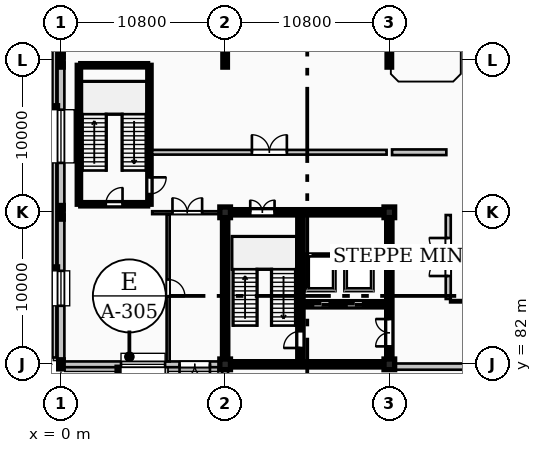
"""IFC4 building model, lengths in metres.
Left out: names, types, materials, properties, quantities, classifications, styles, units other than length and angle.
Written with IfcOpenShell. Run it as: python <this file> out.ifc"""

import sys

from ifc_helpers import new_model, si_unit, direction, frame, frame_2d, origin, origin_2d, place, context, subcontext, project, spatial, rectangle, i_section, extrude, element, fill, save


model = new_model("IFC4")
c1 = context("Model", 3, precision=1e-05, world=origin(), true_north=direction((0.0, 1.0)))
c2 = subcontext(c1, "Body", "Model", "MODEL_VIEW")
j1 = project(units=[si_unit("LENGTHUNIT", "METRE"), si_unit("PLANEANGLEUNIT", "RADIAN")], contexts=[c1])
p1 = place(None, origin())
s1 = spatial("IfcSite", under=j1, at=p1, CompositionType="ELEMENT")
p2 = place(p1, origin())
s2 = spatial("IfcBuilding", under=s1, at=p2, CompositionType="ELEMENT")
p3 = place(p2, origin())
s3 = spatial("IfcBuildingStorey", under=s2, at=p3, CompositionType="ELEMENT", Elevation=0.0)
p4 = place(p3, frame((0.0, 82.0, 0.0), z_axis=(0.0, 0.0, 1.0), x_axis=(1.0, 0.0, 0.0)))
e1 = element("IfcColumn", 1, at=p4, inside=s3, PredefinedType="COLUMN", context=c2, shape_type="SweptSolid", body=[
    extrude(i_section(OverallWidth=0.3, OverallDepth=0.6, WebThickness=0.015, FlangeThickness=0.03, FilletRadius=0.027, at=origin_2d()), origin(), (0.0, 0.0, 1.0), 4.8),
])
for number, where, z_axis, x_axis in (
    (2, (0.0, 92.0, 0.0), (0.0, 0.0, 1.0), (1.0, 0.0, 0.0)),
    (3, (0.0, 102.0, 0.0), (0.0, 0.0, 1.0), (1.0, 0.0, 0.0)),
):
    element("IfcColumn", number, at=place(p3, frame(where, z_axis=z_axis, x_axis=x_axis)), inside=s3, PredefinedType="COLUMN", context=c2, shape_type="SweptSolid", body=[
        extrude(i_section(OverallWidth=0.3, OverallDepth=0.9, WebThickness=0.019, FlangeThickness=0.035, FilletRadius=0.03, at=origin_2d()), origin(), (0.0, 0.0, 1.0), 4.8),
    ])
for number, where, z_axis, x_axis in (
    (4, (10.8, 82.0, 0.0), (0.0, 0.0, 1.0), (1.0, 0.0, 0.0)),
    (5, (10.8, 92.0, 0.0), (0.0, 0.0, 1.0), (1.0, 0.0, 0.0)),
):
    element("IfcColumn", number, at=place(p3, frame(where, z_axis=z_axis, x_axis=x_axis)), inside=s3, PredefinedType="COLUMN", context=c2, shape_type="SweptSolid", body=[
        extrude(rectangle(XDim=0.7, YDim=0.7, at=origin_2d()), origin(), (0.0, 0.0, 1.0), 4.8),
    ])
p5 = place(p3, frame((10.8, 102.0, 0.0), z_axis=(0.0, 0.0, 1.0), x_axis=(1.0, 0.0, 0.0)))
e6 = element("IfcColumn", 6, at=p5, inside=s3, PredefinedType="COLUMN", context=c2, shape_type="SweptSolid", body=[
    extrude(i_section(OverallWidth=0.3, OverallDepth=0.9, WebThickness=0.019, FlangeThickness=0.035, FilletRadius=0.03, at=origin_2d()), origin(), (0.0, 0.0, 1.0), 4.8),
])
for number, where, z_axis, x_axis in (
    (7, (21.6, 82.0, 0.0), (0.0, 0.0, 1.0), (1.0, 0.0, 0.0)),
    (8, (21.6, 92.0, 0.0), (0.0, 0.0, 1.0), (1.0, 0.0, 0.0)),
):
    element("IfcColumn", number, at=place(p3, frame(where, z_axis=z_axis, x_axis=x_axis)), inside=s3, PredefinedType="COLUMN", context=c2, shape_type="SweptSolid", body=[
        extrude(rectangle(XDim=0.7, YDim=0.7, at=origin_2d()), origin(), (0.0, 0.0, 1.0), 4.8),
    ])
p6 = place(p3, frame((21.6, 102.0, 0.0), z_axis=(0.0, 0.0, 1.0), x_axis=(1.0, 0.0, 0.0)))
e9 = element("IfcColumn", 9, at=p6, inside=s3, PredefinedType="COLUMN", context=c2, shape_type="SweptSolid", body=[
    extrude(i_section(OverallWidth=0.3, OverallDepth=0.9, WebThickness=0.019, FlangeThickness=0.035, FilletRadius=0.03, at=origin_2d()), origin(), (0.0, 0.0, 1.0), 4.8),
])
p7 = place(p3, frame((-0.43, 82.45, -1.38), z_axis=(0.0, 0.0, 1.0), x_axis=(0.0, 1.0, 0.0)))
e10 = element("IfcWall", 10, at=p7, inside=s3, PredefinedType="PARAPET", context=c2, shape_type="SweptSolid", body=[
    extrude(rectangle(XDim=29.1, YDim=0.26, at=frame_2d((14.55, 0.0))), origin(), (0.0, 0.0, 1.0), 5.92),
])
p8 = place(p3, frame((0.0, 111.855, 0.0), z_axis=(0.0, 0.0, 1.0), x_axis=(0.0, -1.0, 0.0)))
e11 = element("IfcWall", 11, at=p8, inside=s3, PredefinedType="STANDARD", context=c2, shape_type="SweptSolid", body=[
    extrude(rectangle(XDim=9.71, YDim=0.45, at=frame_2d((4.855, 0.0))), origin(), (0.0, 0.0, 1.0), 4.56),
])
p9 = place(p8, frame((4.08, 0.0, 1.0)))
e12 = element("IfcOpeningElement", 12, at=p9, cuts=e11, PredefinedType="OPENING", context=c2, shape_type="SweptSolid", body=[
    extrude(rectangle(XDim=1.55, YDim=2.5, at=frame_2d((0.775, 1.25))), frame((0.0, 0.235, 0.0), z_axis=(0.0, -1.0, 0.0), x_axis=(1.0, 0.0, 0.0)), (0.0, 0.0, 1.0), 0.47),
])
p10 = place(p3, frame((0.0, 101.855, 0.0), z_axis=(0.0, 0.0, 1.0), x_axis=(0.0, -1.0, 0.0)))
e13 = element("IfcWall", 13, at=p10, inside=s3, PredefinedType="STANDARD", context=c2, shape_type="SweptSolid", body=[
    extrude(rectangle(XDim=9.71, YDim=0.45, at=frame_2d((4.855, 0.0))), origin(), (0.0, 0.0, 1.0), 4.56),
])
p11 = place(p10, frame((3.105, 0.0, 1.0)))
e14 = element("IfcOpeningElement", 14, at=p11, cuts=e13, PredefinedType="OPENING", context=c2, shape_type="SweptSolid", body=[
    extrude(rectangle(XDim=3.5, YDim=2.3, at=frame_2d((1.75, 1.15))), frame((0.0, 0.235, 0.0), z_axis=(0.0, -1.0, 0.0), x_axis=(1.0, 0.0, 0.0)), (0.0, 0.0, 1.0), 0.47),
])
p12 = place(p3, frame((0.0, 91.855, 0.0), z_axis=(0.0, 0.0, 1.0), x_axis=(0.0, -1.0, 0.0)))
e15 = element("IfcWall", 15, at=p12, inside=s3, PredefinedType="STANDARD", context=c2, shape_type="SweptSolid", body=[
    extrude(rectangle(XDim=9.71, YDim=0.45, at=frame_2d((4.855, 0.0))), origin(), (0.0, 0.0, 1.0), 4.56),
])
p13 = place(p12, frame((3.705, 0.0, 1.0)))
e16 = element("IfcOpeningElement", 16, at=p13, cuts=e15, PredefinedType="OPENING", context=c2, shape_type="SweptSolid", body=[
    extrude(rectangle(XDim=2.3, YDim=2.3, at=frame_2d((1.15, 1.15))), frame((0.0, 0.235, 0.0), z_axis=(0.0, -1.0, 0.0), x_axis=(1.0, 0.0, 0.0)), (0.0, 0.0, 1.0), 0.47),
])
p14 = place(p3, frame((0.145, 82.0, 0.0), z_axis=(0.0, 0.0, 1.0), x_axis=(1.0, 0.0, 0.0)))
e17 = element("IfcWall", 17, at=p14, inside=s3, PredefinedType="STANDARD", context=c2, shape_type="SweptSolid", body=[
    extrude(rectangle(XDim=10.51, YDim=0.38, at=frame_2d((5.255, 0.0))), origin(), (0.0, 0.0, 1.0), 4.009),
])
p15 = place(p14, frame((3.805, 0.0, 1.0)))
e18 = element("IfcOpeningElement", 18, at=p15, cuts=e17, PredefinedType="OPENING", context=c2, shape_type="SweptSolid", body=[
    extrude(rectangle(XDim=2.9, YDim=2.5, at=frame_2d((1.45, 1.25))), frame((0.0, 0.2, 0.0), z_axis=(0.0, -1.0, 0.0), x_axis=(1.0, 0.0, 0.0)), (0.0, 0.0, 1.0), 0.4),
])
p16 = place(p14, frame((7.655, 0.0, 0.0)))
e19 = element("IfcOpeningElement", 19, at=p16, cuts=e17, PredefinedType="OPENING", context=c2, shape_type="SweptSolid", body=[
    extrude(rectangle(XDim=2.0, YDim=2.3, at=frame_2d((1.0, 1.15))), frame((0.0, 0.2, 0.0), z_axis=(0.0, -1.0, 0.0), x_axis=(1.0, 0.0, 0.0)), (0.0, 0.0, 1.0), 0.4),
])
p17 = place(p3, frame((10.8, 81.855, 0.0), z_axis=(0.0, 0.0, 1.0), x_axis=(0.0, -1.0, 0.0)))
e20 = element("IfcWall", 20, at=p17, inside=s3, PredefinedType="STANDARD", context=c2, shape_type="SweptSolid", body=[
    extrude(rectangle(XDim=9.71, YDim=0.38, at=frame_2d((4.855, 0.0))), origin(), (0.0, 0.0, 1.0), 4.04),
])
p18 = place(p17, frame((3.655, 0.0, 0.0)))
e21 = element("IfcOpeningElement", 21, at=p18, cuts=e20, PredefinedType="OPENING", context=c2, shape_type="SweptSolid", body=[
    extrude(rectangle(XDim=2.4, YDim=2.6, at=frame_2d((1.2, 1.3))), frame((0.0, 0.2, 0.0), z_axis=(0.0, -1.0, 0.0), x_axis=(1.0, 0.0, 0.0)), (0.0, 0.0, 1.0), 0.4),
])
p19 = place(p3, frame((11.15, 82.0, 0.0), z_axis=(0.0, 0.0, 1.0), x_axis=(1.0, 0.0, 0.0)))
e22 = element("IfcWall", 22, at=p19, inside=s3, PredefinedType="SHEAR", context=c2, shape_type="SweptSolid", body=[
    extrude(rectangle(XDim=10.1, YDim=0.35, at=frame_2d((5.05, 0.0))), origin(), (0.0, 0.0, 1.0), 4.56),
])
p20 = place(p3, frame((11.15, 92.0, 0.0), z_axis=(0.0, 0.0, 1.0), x_axis=(1.0, 0.0, 0.0)))
e23 = element("IfcWall", 23, at=p20, inside=s3, PredefinedType="SHEAR", context=c2, shape_type="SweptSolid", body=[
    extrude(rectangle(XDim=10.1, YDim=0.35, at=frame_2d((5.05, 0.0))), origin(), (0.0, 0.0, 1.0), 4.56),
])
p21 = place(p20, frame((1.3, 0.0, 0.0)))
e24 = element("IfcOpeningElement", 24, at=p21, cuts=e23, PredefinedType="OPENING", context=c2, shape_type="SweptSolid", body=[
    extrude(rectangle(XDim=1.6, YDim=2.2, at=frame_2d((0.8, 1.1))), frame((0.0, 0.185, 0.0), z_axis=(0.0, -1.0, 0.0), x_axis=(1.0, 0.0, 0.0)), (0.0, 0.0, 1.0), 0.37),
])
p22 = place(p3, frame((10.8, 82.35, 0.0), z_axis=(0.0, 0.0, 1.0), x_axis=(0.0, 1.0, 0.0)))
e25 = element("IfcWall", 25, at=p22, inside=s3, PredefinedType="SHEAR", context=c2, shape_type="SweptSolid", body=[
    extrude(rectangle(XDim=9.3, YDim=0.35, at=frame_2d((4.65, 0.0))), origin(), (0.0, 0.0, 1.0), 4.56),
])
p23 = place(p3, frame((21.6, 82.35, 0.0), z_axis=(0.0, 0.0, 1.0), x_axis=(0.0, 1.0, 0.0)))
e26 = element("IfcWall", 26, at=p23, inside=s3, PredefinedType="SHEAR", context=c2, shape_type="SweptSolid", body=[
    extrude(rectangle(XDim=9.3, YDim=0.35, at=frame_2d((4.65, 0.0))), origin(), (0.0, 0.0, 1.0), 4.56),
])
p24 = place(p23, frame((0.83, 0.0, 0.0)))
e27 = element("IfcOpeningElement", 27, at=p24, cuts=e26, PredefinedType="OPENING", context=c2, shape_type="SweptSolid", body=[
    extrude(rectangle(XDim=1.8, YDim=2.25, at=frame_2d((0.9, 1.125))), frame((0.0, 0.185, 0.0), z_axis=(0.0, -1.0, 0.0), x_axis=(1.0, 0.0, 0.0)), (0.0, 0.0, 1.0), 0.37),
])
p25 = place(p3, frame((15.75, 82.175, 0.0), z_axis=(0.0, 0.0, 1.0), x_axis=(0.0, 1.0, 0.0)))
e28 = element("IfcWall", 28, at=p25, inside=s3, PredefinedType="SHEAR", context=c2, shape_type="SweptSolid", body=[
    extrude(rectangle(XDim=9.65, YDim=0.35, at=frame_2d((4.825, 0.0))), origin(), (0.0, 0.0, 1.0), 4.56),
])
p26 = place(p25, frame((0.9, 0.0, 0.0)))
e29 = element("IfcOpeningElement", 29, at=p26, cuts=e28, PredefinedType="OPENING", context=c2, shape_type="SweptSolid", body=[
    extrude(rectangle(XDim=1.1, YDim=2.2, at=frame_2d((0.55, 1.1))), frame((0.0, 0.185, 0.0), z_axis=(0.0, -1.0, 0.0), x_axis=(1.0, 0.0, 0.0)), (0.0, 0.0, 1.0), 0.37),
])
p27 = place(p3, frame((15.93, 85.95, 0.0), z_axis=(0.0, 0.0, 1.0), x_axis=(1.0, 0.0, 0.0)))
e30 = element("IfcWall", 30, at=p27, inside=s3, PredefinedType="SHEAR", context=c2, shape_type="SweptSolid", body=[
    extrude(rectangle(XDim=5.49, YDim=0.35, at=frame_2d((2.745, 0.0))), origin(), (0.0, 0.0, 1.0), 4.56),
])
p28 = place(p27, frame((0.65, 0.0, 0.0)))
e31 = element("IfcOpeningElement", 31, at=p28, cuts=e30, PredefinedType="OPENING", context=c2, shape_type="SweptSolid", body=[
    extrude(rectangle(XDim=1.1, YDim=2.2, at=frame_2d((0.55, 1.1))), frame((0.0, 0.185, 0.0), z_axis=(0.0, -1.0, 0.0), x_axis=(1.0, 0.0, 0.0)), (0.0, 0.0, 1.0), 0.37),
])
p29 = place(p27, frame((2.85, 0.0, 0.0)))
e32 = element("IfcOpeningElement", 32, at=p29, cuts=e30, PredefinedType="OPENING", context=c2, shape_type="SweptSolid", body=[
    extrude(rectangle(XDim=1.1, YDim=2.2, at=frame_2d((0.55, 1.1))), frame((0.0, 0.185, 0.0), z_axis=(0.0, -1.0, 0.0), x_axis=(1.0, 0.0, 0.0)), (0.0, 0.0, 1.0), 0.37),
])
p30 = place(p3, frame((1.18, 92.53, 0.0), z_axis=(0.0, 0.0, 1.0), x_axis=(0.0, 1.0, 0.0)))
e33 = element("IfcWall", 33, at=p30, inside=s3, PredefinedType="SHEAR", context=c2, shape_type="SweptSolid", body=[
    extrude(rectangle(XDim=9.14, YDim=0.22, at=frame_2d((4.57, 0.0))), origin(), (0.0, 0.0, 1.0), 4.56),
])
p31 = place(p3, frame((5.82, 92.53, 0.0), z_axis=(0.0, 0.0, 1.0), x_axis=(0.0, 1.0, 0.0)))
e34 = element("IfcWall", 34, at=p31, inside=s3, PredefinedType="SHEAR", context=c2, shape_type="SweptSolid", body=[
    extrude(rectangle(XDim=9.14, YDim=0.22, at=frame_2d((4.57, 0.0))), origin(), (0.0, 0.0, 1.0), 4.56),
])
p32 = place(p31, frame((0.67, 0.0, 0.0)))
e35 = element("IfcOpeningElement", 35, at=p32, cuts=e34, PredefinedType="OPENING", context=c2, shape_type="SweptSolid", body=[
    extrude(rectangle(XDim=1.1, YDim=2.2, at=frame_2d((0.55, 1.1))), frame((0.0, 0.12, 0.0), z_axis=(0.0, -1.0, 0.0), x_axis=(1.0, 0.0, 0.0)), (0.0, 0.0, 1.0), 0.24),
])
p33 = place(p3, frame((1.3, 101.67, 0.0), z_axis=(0.0, 0.0, 1.0), x_axis=(1.0, 0.0, 0.0)))
e36 = element("IfcWall", 36, at=p33, inside=s3, PredefinedType="SHEAR", context=c2, shape_type="SweptSolid", body=[
    extrude(rectangle(XDim=4.4, YDim=0.22, at=frame_2d((2.2, 0.0))), origin(), (0.0, 0.0, 1.0), 4.56),
])
p34 = place(p3, frame((1.3, 92.53, 0.0), z_axis=(0.0, 0.0, 1.0), x_axis=(1.0, 0.0, 0.0)))
e37 = element("IfcWall", 37, at=p34, inside=s3, PredefinedType="SHEAR", context=c2, shape_type="SweptSolid", body=[
    extrude(rectangle(XDim=4.4, YDim=0.22, at=frame_2d((2.2, 0.0))), origin(), (0.0, 0.0, 1.0), 4.56),
])
p35 = place(p34, frame((1.65, 0.0, 0.0)))
e38 = element("IfcOpeningElement", 38, at=p35, cuts=e37, PredefinedType="OPENING", context=c2, shape_type="SweptSolid", body=[
    extrude(rectangle(XDim=1.1, YDim=2.2, at=frame_2d((0.55, 1.1))), frame((0.0, 0.12, 0.0), z_axis=(0.0, -1.0, 0.0), x_axis=(1.0, 0.0, 0.0)), (0.0, 0.0, 1.0), 0.24),
])
p36 = place(p3, frame((21.78, 81.85, 0.0), z_axis=(0.0, 0.0, 1.0), x_axis=(1.0, 0.0, 0.0)))
e39 = element("IfcWall", 39, at=p36, inside=s3, PredefinedType="PARTITIONING", context=c2, shape_type="SweptSolid", body=[
    extrude(rectangle(XDim=10.42, YDim=0.41, at=frame_2d((5.21, 0.0))), origin(), (0.0, 0.0, 1.0), 3.989),
])
p37 = place(p3, frame((25.6, 86.15, 0.0), z_axis=(0.0, 0.0, 1.0), x_axis=(1.0, 0.0, 0.0)))
e40 = element("IfcWall", 40, at=p37, inside=s3, PredefinedType="PARTITIONING", context=c2, shape_type="SweptSolid", body=[
    extrude(rectangle(XDim=28.22, YDim=0.15, at=frame_2d((14.11, 0.0))), origin(), (0.0, 0.0, 1.0), 4.52),
])
p38 = place(p37, frame((13.235, 0.0, 0.0)))
e41 = element("IfcOpeningElement", 41, at=p38, cuts=e40, PredefinedType="OPENING", context=c2, shape_type="SweptSolid", body=[
    extrude(rectangle(XDim=1.75, YDim=2.45, at=frame_2d((0.875, 1.225))), frame((0.0, 0.085, 0.0), z_axis=(0.0, -1.0, 0.0), x_axis=(1.0, 0.0, 0.0)), (0.0, 0.0, 1.0), 0.17),
])
p39 = place(p3, frame((6.0, 91.975, 0.0), z_axis=(0.0, 0.0, 1.0), x_axis=(1.0, 0.0, 0.0)))
e42 = element("IfcWall", 42, at=p39, inside=s3, PredefinedType="PARTITIONING", context=c2, shape_type="SweptSolid", body=[
    extrude(rectangle(XDim=4.62, YDim=0.19, at=frame_2d((2.31, 0.0))), origin(), (0.0, 0.0, 1.0), 4.069),
])
p40 = place(p39, frame((1.335, 0.0, 0.0)))
e43 = element("IfcOpeningElement", 43, at=p40, cuts=e42, PredefinedType="OPENING", context=c2, shape_type="SweptSolid", body=[
    extrude(rectangle(XDim=1.95, YDim=2.5, at=frame_2d((0.975, 1.25))), frame((0.0, 0.105, 0.0), z_axis=(0.0, -1.0, 0.0), x_axis=(1.0, 0.0, 0.0)), (0.0, 0.0, 1.0), 0.21),
])
p41 = place(p3, frame((6.0, 95.95, 0.0), z_axis=(0.0, 0.0, 1.0), x_axis=(1.0, 0.0, 0.0)))
e44 = element("IfcWall", 44, at=p41, inside=s3, PredefinedType="PARTITIONING", context=c2, shape_type="SweptSolid", body=[
    extrude(rectangle(XDim=15.42, YDim=0.31, at=frame_2d((7.71, 0.0))), origin(), (0.0, 0.0, 1.0), 4.52),
])
p42 = place(p41, frame((6.56, 0.0, 0.0)))
e45 = element("IfcOpeningElement", 45, at=p42, cuts=e44, PredefinedType="OPENING", context=c2, shape_type="SweptSolid", body=[
    extrude(rectangle(XDim=2.3, YDim=2.65, at=frame_2d((1.15, 1.325))), frame((0.0, 0.165, 0.0), z_axis=(0.0, -1.0, 0.0), x_axis=(1.0, 0.0, 0.0)), (0.0, 0.0, 1.0), 0.33),
])
p43 = place(p3, frame((25.475, 86.3, 0.0), z_axis=(0.0, 0.0, 1.0), x_axis=(0.0, 1.0, 0.0)))
e46 = element("IfcWall", 46, at=p43, inside=s3, PredefinedType="PARTITIONING", context=c2, shape_type="SweptSolid", body=[
    extrude(rectangle(XDim=5.52, YDim=0.33, at=frame_2d((2.76, 0.0))), origin(), (0.0, 0.0, 1.0), 4.52),
])
p44 = place(p43, frame((1.51, 0.0, 0.0)))
e47 = element("IfcOpeningElement", 47, at=p44, cuts=e46, PredefinedType="OPENING", context=c2, shape_type="SweptSolid", body=[
    extrude(rectangle(XDim=2.5, YDim=2.75, at=frame_2d((1.25, 1.375))), frame((0.0, 0.175, 0.0), z_axis=(0.0, -1.0, 0.0), x_axis=(1.0, 0.0, 0.0)), (0.0, 0.0, 1.0), 0.35),
])
p45 = place(p3, frame((21.78, 95.95, 0.0), z_axis=(0.0, 0.0, 1.0), x_axis=(1.0, 0.0, 0.0)))
e48 = element("IfcWall", 48, at=p45, inside=s3, PredefinedType="PARTITIONING", context=c2, shape_type="SweptSolid", body=[
    extrude(rectangle(XDim=3.57, YDim=0.37, at=frame_2d((1.785, 0.0))), origin(), (0.0, 0.0, 1.0), 4.52),
])
p46 = place(p3, frame((7.05, 82.19, 0.0), z_axis=(0.0, 0.0, 1.0), x_axis=(0.0, 1.0, 0.0)))
e49 = element("IfcWall", 49, at=p46, inside=s3, PredefinedType="SOLIDWALL", context=c2, shape_type="SweptSolid", body=[
    extrude(rectangle(XDim=9.69, YDim=0.2, at=frame_2d((4.845, 0.0))), origin(), (0.0, 0.0, 1.0), 4.069),
])
p47 = place(p46, frame((4.29, 0.0, 0.0)))
e50 = element("IfcOpeningElement", 50, at=p47, cuts=e49, PredefinedType="OPENING", context=c2, shape_type="SweptSolid", body=[
    extrude(rectangle(XDim=1.1, YDim=2.2, at=frame_2d((0.55, 1.1))), frame((0.0, 0.11, 0.0), z_axis=(0.0, -1.0, 0.0), x_axis=(1.0, 0.0, 0.0)), (0.0, 0.0, 1.0), 0.22),
])
p48 = place(p11, origin())
e51 = element("IfcWindow", 51, at=p48, inside=s3, PartitioningType="SINGLE_PANEL", PredefinedType="WINDOW", context=c2, shape_type="SweptSolid", body=[
    extrude(rectangle(XDim=3.5, YDim=2.3, at=frame_2d((1.75, 1.15))), frame((0.0, 0.03, 0.0), z_axis=(0.0, -1.0, 0.0), x_axis=(1.0, 0.0, 0.0)), (0.0, 0.0, 1.0), 0.06),
])
fill(e14, e51)
p49 = place(p13, origin())
e52 = element("IfcWindow", 52, at=p49, inside=s3, PartitioningType="SINGLE_PANEL", PredefinedType="WINDOW", context=c2, shape_type="SweptSolid", body=[
    extrude(rectangle(XDim=2.3, YDim=2.3, at=frame_2d((1.15, 1.15))), frame((0.0, 0.03, 0.0), z_axis=(0.0, -1.0, 0.0), x_axis=(1.0, 0.0, 0.0)), (0.0, 0.0, 1.0), 0.06),
])
fill(e16, e52)
p50 = place(p15, origin())
e53 = element("IfcWindow", 53, at=p50, inside=s3, PartitioningType="SINGLE_PANEL", PredefinedType="WINDOW", context=c2, shape_type="SweptSolid", body=[
    extrude(rectangle(XDim=2.9, YDim=2.5, at=frame_2d((1.45, 1.25))), frame((0.0, 0.03, 0.0), z_axis=(0.0, -1.0, 0.0), x_axis=(1.0, 0.0, 0.0)), (0.0, 0.0, 1.0), 0.06),
])
fill(e18, e53)
p51 = place(p26, origin())
e54 = element("IfcDoor", 54, at=p51, inside=s3, OperationType="SINGLE_SWING_LEFT", PredefinedType="DOOR", context=c2, shape_type="SweptSolid", body=[
    extrude(rectangle(XDim=1.1, YDim=2.2, at=frame_2d((0.55, 1.1))), frame((0.0, 0.025, 0.0), z_axis=(0.0, -1.0, 0.0), x_axis=(1.0, 0.0, 0.0)), (0.0, 0.0, 1.0), 0.05),
])
fill(e29, e54)
p52 = place(p24, origin())
e55 = element("IfcDoor", 55, at=p52, inside=s3, OperationType="DOUBLE_DOOR_SINGLE_SWING", PredefinedType="DOOR", context=c2, shape_type="SweptSolid", body=[
    extrude(rectangle(XDim=1.8, YDim=2.25, at=frame_2d((0.9, 1.125))), frame((0.0, 0.025, 0.0), z_axis=(0.0, -1.0, 0.0), x_axis=(1.0, 0.0, 0.0)), (0.0, 0.0, 1.0), 0.05),
])
fill(e27, e55)
p53 = place(p21, origin())
e56 = element("IfcDoor", 56, at=p53, inside=s3, OperationType="DOUBLE_DOOR_SINGLE_SWING", PredefinedType="DOOR", context=c2, shape_type="SweptSolid", body=[
    extrude(rectangle(XDim=1.6, YDim=2.2, at=frame_2d((0.8, 1.1))), frame((0.0, 0.025, 0.0), z_axis=(0.0, -1.0, 0.0), x_axis=(1.0, 0.0, 0.0)), (0.0, 0.0, 1.0), 0.05),
])
fill(e24, e56)
p54 = place(p28, origin())
e57 = element("IfcDoor", 57, at=p54, inside=s3, OperationType="DOUBLE_DOOR_SLIDING", PredefinedType="DOOR", context=c2, shape_type="SweptSolid", body=[
    extrude(rectangle(XDim=1.1, YDim=2.2, at=frame_2d((0.55, 1.1))), frame((0.0, 0.025, 0.0), z_axis=(0.0, -1.0, 0.0), x_axis=(1.0, 0.0, 0.0)), (0.0, 0.0, 1.0), 0.05),
])
fill(e31, e57)
p55 = place(p29, origin())
e58 = element("IfcDoor", 58, at=p55, inside=s3, OperationType="DOUBLE_DOOR_SLIDING", PredefinedType="DOOR", context=c2, shape_type="SweptSolid", body=[
    extrude(rectangle(XDim=1.1, YDim=2.2, at=frame_2d((0.55, 1.1))), frame((0.0, 0.025, 0.0), z_axis=(0.0, -1.0, 0.0), x_axis=(1.0, 0.0, 0.0)), (0.0, 0.0, 1.0), 0.05),
])
fill(e32, e58)
p56 = place(p35, origin())
e59 = element("IfcDoor", 59, at=p56, inside=s3, OperationType="SINGLE_SWING_RIGHT", PredefinedType="DOOR", context=c2, shape_type="SweptSolid", body=[
    extrude(rectangle(XDim=1.1, YDim=2.2, at=frame_2d((0.55, 1.1))), frame((0.0, 0.025, 0.0), z_axis=(0.0, -1.0, 0.0), x_axis=(1.0, 0.0, 0.0)), (0.0, 0.0, 1.0), 0.05),
])
fill(e38, e59)
p57 = place(p40, origin())
e60 = element("IfcDoor", 60, at=p57, inside=s3, OperationType="DOUBLE_DOOR_SINGLE_SWING", PredefinedType="DOOR", context=c2, shape_type="SweptSolid", body=[
    extrude(rectangle(XDim=1.95, YDim=2.5, at=frame_2d((0.975, 1.25))), frame((0.0, 0.025, 0.0), z_axis=(0.0, -1.0, 0.0), x_axis=(1.0, 0.0, 0.0)), (0.0, 0.0, 1.0), 0.05),
])
fill(e43, e60)
p58 = place(p42, origin())
e61 = element("IfcDoor", 61, at=p58, inside=s3, OperationType="DOUBLE_DOOR_SINGLE_SWING", PredefinedType="DOOR", context=c2, shape_type="SweptSolid", body=[
    extrude(rectangle(XDim=2.3, YDim=2.65, at=frame_2d((1.15, 1.325))), frame((0.0, 0.025, 0.0), z_axis=(0.0, -1.0, 0.0), x_axis=(1.0, 0.0, 0.0)), (0.0, 0.0, 1.0), 0.05),
])
fill(e45, e61)
p59 = place(p44, origin())
e62 = element("IfcDoor", 62, at=p59, inside=s3, OperationType="DOUBLE_DOOR_SINGLE_SWING", PredefinedType="DOOR", context=c2, shape_type="SweptSolid", body=[
    extrude(rectangle(XDim=2.5, YDim=2.75, at=frame_2d((1.25, 1.375))), frame((0.0, 0.025, 0.0), z_axis=(0.0, -1.0, 0.0), x_axis=(1.0, 0.0, 0.0)), (0.0, 0.0, 1.0), 0.05),
])
fill(e47, e62)
p60 = place(p47, frame((1.1, 0.0, 0.0), z_axis=(0.0, 0.0, 1.0), x_axis=(-1.0, 0.0, 0.0)))
e63 = element("IfcDoor", 63, at=p60, inside=s3, OperationType="SINGLE_SWING_LEFT", PredefinedType="DOOR", context=c2, shape_type="SweptSolid", body=[
    extrude(rectangle(XDim=1.1, YDim=2.2, at=frame_2d((0.55, 1.1))), frame((0.0, 0.025, 0.0), z_axis=(0.0, -1.0, 0.0), x_axis=(1.0, 0.0, 0.0)), (0.0, 0.0, 1.0), 0.05),
])
fill(e50, e63)
p61 = place(p16, frame((2.0, 0.0, 0.0), z_axis=(0.0, 0.0, 1.0), x_axis=(-1.0, 0.0, 0.0)))
e64 = element("IfcDoor", 64, at=p61, inside=s3, OperationType="DOUBLE_DOOR_SINGLE_SWING", PredefinedType="DOOR", context=c2, shape_type="SweptSolid", body=[
    extrude(rectangle(XDim=2.0, YDim=2.3, at=frame_2d((1.0, 1.15))), frame((0.0, 0.025, 0.0), z_axis=(0.0, -1.0, 0.0), x_axis=(1.0, 0.0, 0.0)), (0.0, 0.0, 1.0), 0.05),
])
fill(e19, e64)
p62 = place(p32, frame((1.1, 0.0, 0.0), z_axis=(0.0, 0.0, 1.0), x_axis=(-1.0, 0.0, 0.0)))
e65 = element("IfcDoor", 65, at=p62, inside=s3, OperationType="SINGLE_SWING_RIGHT", PredefinedType="DOOR", context=c2, shape_type="SweptSolid", body=[
    extrude(rectangle(XDim=1.1, YDim=2.2, at=frame_2d((0.55, 1.1))), frame((0.0, 0.025, 0.0), z_axis=(0.0, -1.0, 0.0), x_axis=(1.0, 0.0, 0.0)), (0.0, 0.0, 1.0), 0.05),
])
fill(e35, e65)
save(model, sys.argv[1])
